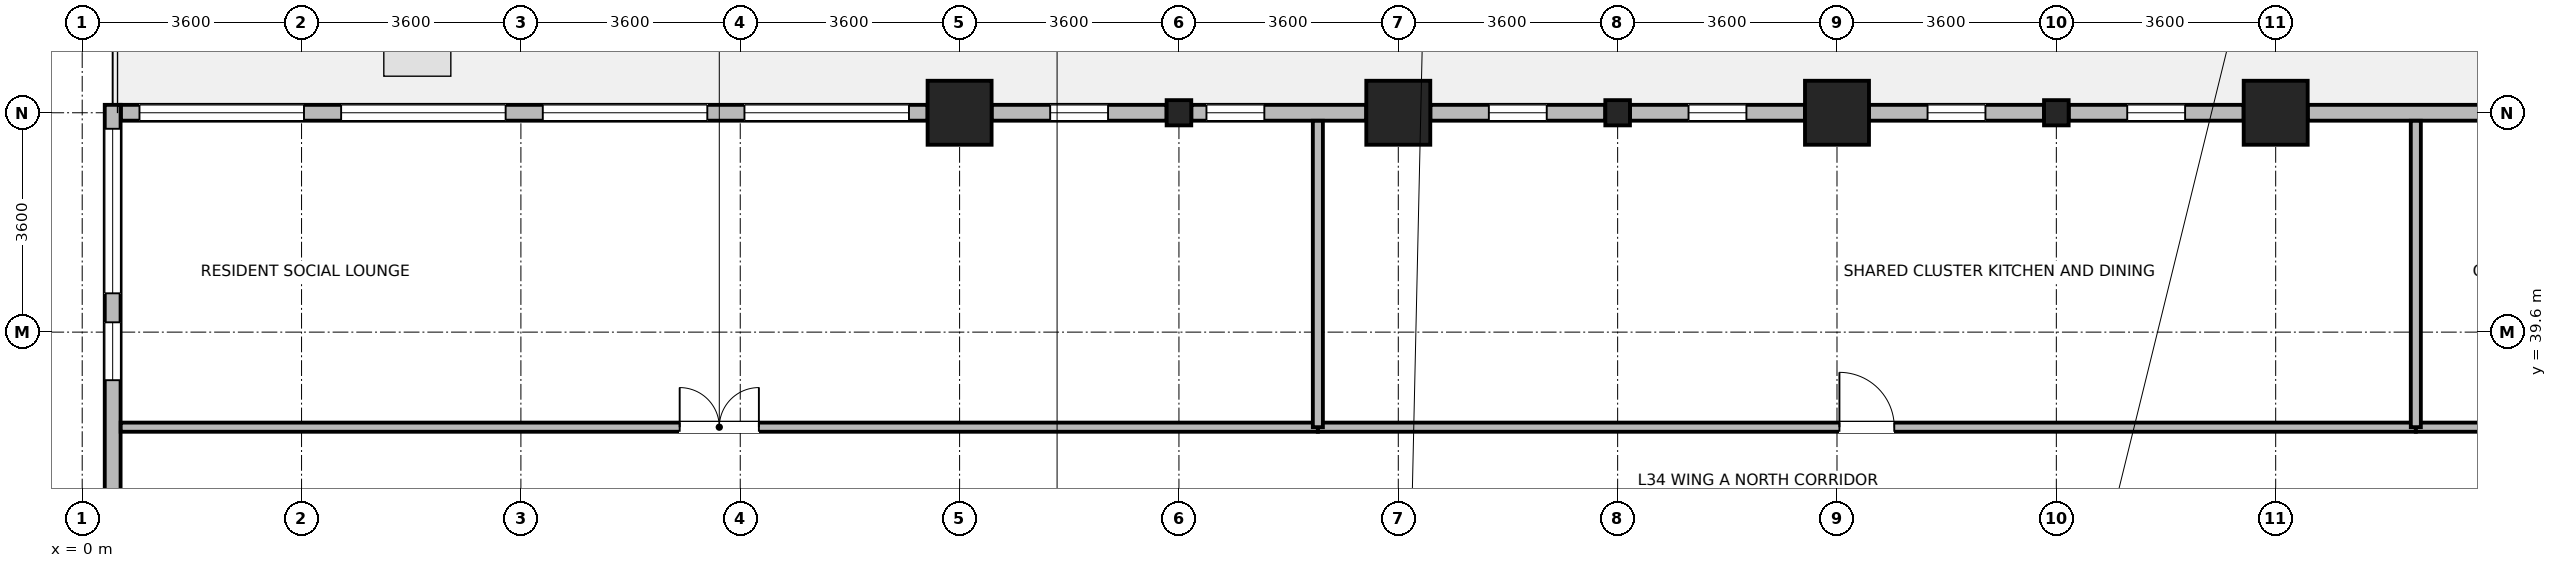
"""IFC4 building model, lengths in metres.
Left out: names, types, materials, properties, quantities, classifications, styles, units other than length and angle.
Written with IfcOpenShell. Run it as: python <this file> out.ifc"""

import sys

from ifc_helpers import new_model, si_unit, direction, frame, frame_2d, origin, origin_2d, place, context, subcontext, project, spatial, rectangle, i_section, extrude, source, transform, mapped, element, fill, save


model = new_model("IFC4")
c1 = context("Model", 3, precision=1e-05, world=origin(), true_north=direction((0.0, 1.0)))
c2 = subcontext(c1, "Body", "Model", "MODEL_VIEW")
j1 = project(units=[si_unit("LENGTHUNIT", "METRE"), si_unit("PLANEANGLEUNIT", "RADIAN")], contexts=[c1])
p1 = place(None, origin())
s1 = spatial("IfcSite", under=j1, at=p1, CompositionType="ELEMENT")
p2 = place(p1, origin())
s2 = spatial("IfcBuilding", under=s1, at=p2, CompositionType="ELEMENT")
p3 = place(p2, frame((0.0, 0.0, 135.6)))
s3 = spatial("IfcBuildingStorey", under=s2, at=p3, CompositionType="ELEMENT", Elevation=135.6)
m1 = source(origin(), c2, "Body", "SweptSolid", [
    extrude(rectangle(XDim=1.05, YDim=1.05, at=origin_2d()), origin(), (0.0, 0.0, 1.0), 4.6),
])
for number, where, z_axis, x_axis in (
    (1, (14.4, 43.2, 0.0), (0.0, 0.0, 1.0), (1.0, 0.0, 0.0)),
    (2, (21.6, 43.2, 0.0), (0.0, 0.0, 1.0), (1.0, 0.0, 0.0)),
    (3, (28.8, 43.2, 0.0), (0.0, 0.0, 1.0), (1.0, 0.0, 0.0)),
    (4, (36.0, 43.2, 0.0), (0.0, 0.0, 1.0), (1.0, 0.0, 0.0)),
):
    element("IfcColumn", number, at=place(p3, frame(where, z_axis=z_axis, x_axis=x_axis)), inside=s3, PredefinedType="COLUMN", context=c2, shape_type="MappedRepresentation", body=[
        mapped(m1, transform((0.0, 0.0, 0.0), x_axis=(1.0, 0.0, 0.0), y_axis=(0.0, 1.0, 0.0), z_axis=(0.0, 0.0, 1.0), scale=1.0)),
    ])
m2 = source(origin(), c2, "Body", "SweptSolid", [
    extrude(i_section(OverallWidth=0.404, OverallDepth=0.414, WebThickness=0.021, FlangeThickness=0.028, FilletRadius=0.015, at=origin_2d()), origin(), (0.0, 0.0, 1.0), 4.6),
])
for number, where, z_axis, x_axis in (
    (5, (18.0, 43.2, 0.0), (0.0, 0.0, 1.0), (1.0, 0.0, 0.0)),
    (6, (25.2, 43.2, 0.0), (0.0, 0.0, 1.0), (1.0, 0.0, 0.0)),
    (7, (32.4, 43.2, 0.0), (0.0, 0.0, 1.0), (1.0, 0.0, 0.0)),
):
    element("IfcColumn", number, at=place(p3, frame(where, z_axis=z_axis, x_axis=x_axis)), inside=s3, PredefinedType="COLUMN", context=c2, shape_type="MappedRepresentation", body=[
        mapped(m2, transform((0.0, 0.0, 0.0), x_axis=(1.0, 0.0, 0.0), y_axis=(0.0, 1.0, 0.0), z_axis=(0.0, 0.0, 1.0), scale=1.0)),
    ])
p4 = place(p3, frame((36.526, 43.2, 0.0), z_axis=(0.0, 0.0, 1.0), x_axis=(1.0, 0.0, 0.0)))
e8 = element("IfcWall", 8, at=p4, inside=s3, PredefinedType="STANDARD", context=c2, shape_type="SweptSolid", body=[
    extrude(rectangle(XDim=9.748, YDim=0.26, at=frame_2d((4.874, 0.0))), origin(), (0.0, 0.0, 1.0), 3.89),
])
p5 = place(p4, frame((3.524, 0.0, 0.85)))
e9 = element("IfcOpeningElement", 9, at=p5, cuts=e8, PredefinedType="OPENING", context=c2, shape_type="SweptSolid", body=[
    extrude(rectangle(XDim=2.7, YDim=2.05, at=frame_2d((1.35, 1.025))), frame((0.0, 0.14, 0.0), z_axis=(0.0, -1.0, 0.0), x_axis=(1.0, 0.0, 0.0)), (0.0, 0.0, 1.0), 0.28),
])
p6 = place(p4, frame((6.816, 0.0, 0.85)))
e10 = element("IfcOpeningElement", 10, at=p6, cuts=e8, PredefinedType="OPENING", context=c2, shape_type="SweptSolid", body=[
    extrude(rectangle(XDim=0.95, YDim=1.75, at=frame_2d((0.475, 0.875))), frame((0.0, 0.14, 0.0), z_axis=(0.0, -1.0, 0.0), x_axis=(1.0, 0.0, 0.0)), (0.0, 0.0, 1.0), 0.28),
])
p7 = place(p3, frame((32.603, 43.2, 0.0), z_axis=(0.0, 0.0, 1.0), x_axis=(1.0, 0.0, 0.0)))
e11 = element("IfcWall", 11, at=p7, inside=s3, PredefinedType="STANDARD", context=c2, shape_type="SweptSolid", body=[
    extrude(rectangle(XDim=2.871, YDim=0.26, at=frame_2d((1.436, 0.0))), origin(), (0.0, 0.0, 1.0), 3.89),
])
p8 = place(p7, frame((0.96, 0.0, 0.85)))
e12 = element("IfcOpeningElement", 12, at=p8, cuts=e11, PredefinedType="OPENING", context=c2, shape_type="SweptSolid", body=[
    extrude(rectangle(XDim=0.95, YDim=1.75, at=frame_2d((0.475, 0.875))), frame((0.0, 0.14, 0.0), z_axis=(0.0, -1.0, 0.0), x_axis=(1.0, 0.0, 0.0)), (0.0, 0.0, 1.0), 0.28),
])
p9 = place(p3, frame((29.326, 43.2, 0.0), z_axis=(0.0, 0.0, 1.0), x_axis=(1.0, 0.0, 0.0)))
e13 = element("IfcWall", 13, at=p9, inside=s3, PredefinedType="STANDARD", context=c2, shape_type="SweptSolid", body=[
    extrude(rectangle(XDim=2.871, YDim=0.26, at=frame_2d((1.436, 0.0))), origin(), (0.0, 0.0, 1.0), 3.89),
])
p10 = place(p9, frame((0.96, 0.0, 0.85)))
e14 = element("IfcOpeningElement", 14, at=p10, cuts=e13, PredefinedType="OPENING", context=c2, shape_type="SweptSolid", body=[
    extrude(rectangle(XDim=0.95, YDim=1.75, at=frame_2d((0.475, 0.875))), frame((0.0, 0.14, 0.0), z_axis=(0.0, -1.0, 0.0), x_axis=(1.0, 0.0, 0.0)), (0.0, 0.0, 1.0), 0.28),
])
p11 = place(p3, frame((25.403, 43.2, 0.0), z_axis=(0.0, 0.0, 1.0), x_axis=(1.0, 0.0, 0.0)))
e15 = element("IfcWall", 15, at=p11, inside=s3, PredefinedType="STANDARD", context=c2, shape_type="SweptSolid", body=[
    extrude(rectangle(XDim=2.871, YDim=0.26, at=frame_2d((1.436, 0.0))), origin(), (0.0, 0.0, 1.0), 3.89),
])
p12 = place(p11, frame((0.96, 0.0, 0.85)))
e16 = element("IfcOpeningElement", 16, at=p12, cuts=e15, PredefinedType="OPENING", context=c2, shape_type="SweptSolid", body=[
    extrude(rectangle(XDim=0.95, YDim=1.75, at=frame_2d((0.475, 0.875))), frame((0.0, 0.14, 0.0), z_axis=(0.0, -1.0, 0.0), x_axis=(1.0, 0.0, 0.0)), (0.0, 0.0, 1.0), 0.28),
])
p13 = place(p3, frame((22.126, 43.2, 0.0), z_axis=(0.0, 0.0, 1.0), x_axis=(1.0, 0.0, 0.0)))
e17 = element("IfcWall", 17, at=p13, inside=s3, PredefinedType="STANDARD", context=c2, shape_type="SweptSolid", body=[
    extrude(rectangle(XDim=2.871, YDim=0.26, at=frame_2d((1.436, 0.0))), origin(), (0.0, 0.0, 1.0), 3.89),
])
p14 = place(p13, frame((0.96, 0.0, 0.85)))
e18 = element("IfcOpeningElement", 18, at=p14, cuts=e17, PredefinedType="OPENING", context=c2, shape_type="SweptSolid", body=[
    extrude(rectangle(XDim=0.95, YDim=1.75, at=frame_2d((0.475, 0.875))), frame((0.0, 0.14, 0.0), z_axis=(0.0, -1.0, 0.0), x_axis=(1.0, 0.0, 0.0)), (0.0, 0.0, 1.0), 0.28),
])
p15 = place(p3, frame((18.203, 43.2, 0.0), z_axis=(0.0, 0.0, 1.0), x_axis=(1.0, 0.0, 0.0)))
e19 = element("IfcWall", 19, at=p15, inside=s3, PredefinedType="STANDARD", context=c2, shape_type="SweptSolid", body=[
    extrude(rectangle(XDim=2.871, YDim=0.26, at=frame_2d((1.436, 0.0))), origin(), (0.0, 0.0, 1.0), 3.89),
])
p16 = place(p15, frame((0.249, 0.0, 0.85)))
e20 = element("IfcOpeningElement", 20, at=p16, cuts=e19, PredefinedType="OPENING", context=c2, shape_type="SweptSolid", body=[
    extrude(rectangle(XDim=0.95, YDim=1.75, at=frame_2d((0.475, 0.875))), frame((0.0, 0.14, 0.0), z_axis=(0.0, -1.0, 0.0), x_axis=(1.0, 0.0, 0.0)), (0.0, 0.0, 1.0), 0.28),
])
p17 = place(p3, frame((14.926, 43.2, 0.0), z_axis=(0.0, 0.0, 1.0), x_axis=(1.0, 0.0, 0.0)))
e21 = element("IfcWall", 21, at=p17, inside=s3, PredefinedType="STANDARD", context=c2, shape_type="SweptSolid", body=[
    extrude(rectangle(XDim=2.871, YDim=0.26, at=frame_2d((1.436, 0.0))), origin(), (0.0, 0.0, 1.0), 3.89),
])
p18 = place(p17, frame((0.96, 0.0, 0.85)))
e22 = element("IfcOpeningElement", 22, at=p18, cuts=e21, PredefinedType="OPENING", context=c2, shape_type="SweptSolid", body=[
    extrude(rectangle(XDim=0.95, YDim=1.75, at=frame_2d((0.475, 0.875))), frame((0.0, 0.14, 0.0), z_axis=(0.0, -1.0, 0.0), x_axis=(1.0, 0.0, 0.0)), (0.0, 0.0, 1.0), 0.28),
])
p19 = place(p3, frame((0.635, 43.2, 0.0), z_axis=(0.0, 0.0, 1.0), x_axis=(1.0, 0.0, 0.0)))
e23 = element("IfcWall", 23, at=p19, inside=s3, PredefinedType="STANDARD", context=c2, shape_type="SweptSolid", body=[
    extrude(rectangle(XDim=13.239, YDim=0.26, at=frame_2d((6.62, 0.0))), origin(), (0.0, 0.0, 1.0), 4.34),
])
p20 = place(p19, frame((0.305, 0.0, 0.85)))
e24 = element("IfcOpeningElement", 24, at=p20, cuts=e23, PredefinedType="OPENING", context=c2, shape_type="SweptSolid", body=[
    extrude(rectangle(XDim=2.7, YDim=2.05, at=frame_2d((1.35, 1.025))), frame((0.0, 0.14, 0.0), z_axis=(0.0, -1.0, 0.0), x_axis=(1.0, 0.0, 0.0)), (0.0, 0.0, 1.0), 0.28),
])
p21 = place(p19, frame((3.615, 0.0, 0.85)))
e25 = element("IfcOpeningElement", 25, at=p21, cuts=e23, PredefinedType="OPENING", context=c2, shape_type="SweptSolid", body=[
    extrude(rectangle(XDim=2.7, YDim=2.05, at=frame_2d((1.35, 1.025))), frame((0.0, 0.14, 0.0), z_axis=(0.0, -1.0, 0.0), x_axis=(1.0, 0.0, 0.0)), (0.0, 0.0, 1.0), 0.28),
])
p22 = place(p19, frame((6.924, 0.0, 0.85)))
e26 = element("IfcOpeningElement", 26, at=p22, cuts=e23, PredefinedType="OPENING", context=c2, shape_type="SweptSolid", body=[
    extrude(rectangle(XDim=2.7, YDim=2.05, at=frame_2d((1.35, 1.025))), frame((0.0, 0.14, 0.0), z_axis=(0.0, -1.0, 0.0), x_axis=(1.0, 0.0, 0.0)), (0.0, 0.0, 1.0), 0.28),
])
p23 = place(p19, frame((10.234, 0.0, 0.85)))
e27 = element("IfcOpeningElement", 27, at=p23, cuts=e23, PredefinedType="OPENING", context=c2, shape_type="SweptSolid", body=[
    extrude(rectangle(XDim=2.7, YDim=2.05, at=frame_2d((1.35, 1.025))), frame((0.0, 0.14, 0.0), z_axis=(0.0, -1.0, 0.0), x_axis=(1.0, 0.0, 0.0)), (0.0, 0.0, 1.0), 0.28),
])
p24 = place(p3, frame((0.5, 36.358, 0.0), z_axis=(0.0, 0.0, 1.0), x_axis=(0.0, 1.0, 0.0)))
e28 = element("IfcWall", 28, at=p24, inside=s3, PredefinedType="STANDARD", context=c2, shape_type="SweptSolid", body=[
    extrude(rectangle(XDim=6.972, YDim=0.26, at=frame_2d((3.486, 0.0))), origin(), (0.0, 0.0, 1.0), 4.34),
])
p25 = place(p24, frame((3.879, 0.0, 0.85)))
e29 = element("IfcOpeningElement", 29, at=p25, cuts=e28, PredefinedType="OPENING", context=c2, shape_type="SweptSolid", body=[
    extrude(rectangle(XDim=2.7, YDim=2.05, at=frame_2d((1.35, 1.025))), frame((0.0, 0.14, 0.0), z_axis=(0.0, -1.0, 0.0), x_axis=(1.0, 0.0, 0.0)), (0.0, 0.0, 1.0), 0.28),
])
p26 = place(p24, frame((2.453, 0.0, 0.85)))
e30 = element("IfcOpeningElement", 30, at=p26, cuts=e28, PredefinedType="OPENING", context=c2, shape_type="SweptSolid", body=[
    extrude(rectangle(XDim=0.95, YDim=1.75, at=frame_2d((0.475, 0.875))), frame((0.0, 0.14, 0.0), z_axis=(0.0, -1.0, 0.0), x_axis=(1.0, 0.0, 0.0)), (0.0, 0.0, 1.0), 0.28),
])
p27 = place(p3, frame((0.632, 38.04, 0.0), z_axis=(0.0, 0.0, 1.0), x_axis=(1.0, 0.0, 0.0)))
e31 = element("IfcWall", 31, at=p27, inside=s3, PredefinedType="PARTITIONING", context=c2, shape_type="SweptSolid", body=[
    extrude(rectangle(XDim=19.648, YDim=0.15, at=frame_2d((9.824, 0.0))), origin(), (0.0, 0.0, 1.0), 4.34),
])
p28 = place(p27, frame((9.174, 0.0, 0.0)))
e32 = element("IfcOpeningElement", 32, at=p28, cuts=e31, PredefinedType="OPENING", context=c2, shape_type="SweptSolid", body=[
    extrude(rectangle(XDim=1.3, YDim=2.12, at=frame_2d((0.65, 1.06))), frame((0.0, 0.085, 0.0), z_axis=(0.0, -1.0, 0.0), x_axis=(1.0, 0.0, 0.0)), (0.0, 0.0, 1.0), 0.17),
])
p29 = place(p3, frame((20.28, 38.04, 0.0), z_axis=(0.0, 0.0, 1.0), x_axis=(1.0, 0.0, 0.0)))
e33 = element("IfcWall", 33, at=p29, inside=s3, PredefinedType="PARTITIONING", context=c2, shape_type="SweptSolid", body=[
    extrude(rectangle(XDim=18.02, YDim=0.15, at=frame_2d((9.01, 0.0))), origin(), (0.0, 0.0, 1.0), 4.34),
])
p30 = place(p29, frame((8.56, 0.0, 0.0)))
e34 = element("IfcOpeningElement", 34, at=p30, cuts=e33, PredefinedType="OPENING", context=c2, shape_type="SweptSolid", body=[
    extrude(rectangle(XDim=0.9, YDim=2.08, at=frame_2d((0.45, 1.04))), frame((0.0, 0.085, 0.0), z_axis=(0.0, -1.0, 0.0), x_axis=(1.0, 0.0, 0.0)), (0.0, 0.0, 1.0), 0.17),
])
p31 = place(p3, frame((38.3, 38.04, 0.0), z_axis=(0.0, 0.0, 1.0), x_axis=(1.0, 0.0, 0.0)))
e35 = element("IfcWall", 35, at=p31, inside=s3, PredefinedType="PARTITIONING", context=c2, shape_type="SweptSolid", body=[
    extrude(rectangle(XDim=11.46, YDim=0.15, at=frame_2d((5.73, 0.0))), origin(), (0.0, 0.0, 1.0), 4.34),
])
p32 = place(p31, frame((5.08, 0.0, 0.0)))
e36 = element("IfcOpeningElement", 36, at=p32, cuts=e35, PredefinedType="OPENING", context=c2, shape_type="SweptSolid", body=[
    extrude(rectangle(XDim=1.3, YDim=2.12, at=frame_2d((0.65, 1.06))), frame((0.0, 0.085, 0.0), z_axis=(0.0, -1.0, 0.0), x_axis=(1.0, 0.0, 0.0)), (0.0, 0.0, 1.0), 0.17),
])
for number, where, z_axis, x_axis in (
    (37, (20.28, 38.04, 0.0), (0.0, 0.0, 1.0), (0.0, 1.0, 0.0)),
    (38, (38.3, 38.04, 0.0), (0.0, 0.0, 1.0), (0.0, 1.0, 0.0)),
):
    element("IfcWall", number, at=place(p3, frame(where, z_axis=z_axis, x_axis=x_axis)), inside=s3, PredefinedType="PARTITIONING", context=c2, shape_type="SweptSolid", body=[
        extrude(rectangle(XDim=5.028, YDim=0.165, at=frame_2d((2.514, 0.0))), origin(), (0.0, 0.0, 1.0), 4.34),
    ])
p33 = place(p8, origin())
e39 = element("IfcWindow", 39, at=p33, inside=s3, PartitioningType="SINGLE_PANEL", PredefinedType="WINDOW", context=c2, shape_type="SweptSolid", body=[
    extrude(rectangle(XDim=0.95, YDim=1.75, at=frame_2d((0.475, 0.875))), frame((0.0, 0.03, 0.0), z_axis=(0.0, -1.0, 0.0), x_axis=(1.0, 0.0, 0.0)), (0.0, 0.0, 1.0), 0.06),
])
fill(e12, e39)
p34 = place(p10, origin())
e40 = element("IfcWindow", 40, at=p34, inside=s3, PartitioningType="SINGLE_PANEL", PredefinedType="WINDOW", context=c2, shape_type="SweptSolid", body=[
    extrude(rectangle(XDim=0.95, YDim=1.75, at=frame_2d((0.475, 0.875))), frame((0.0, 0.03, 0.0), z_axis=(0.0, -1.0, 0.0), x_axis=(1.0, 0.0, 0.0)), (0.0, 0.0, 1.0), 0.06),
])
fill(e14, e40)
p35 = place(p12, origin())
e41 = element("IfcWindow", 41, at=p35, inside=s3, PartitioningType="SINGLE_PANEL", PredefinedType="WINDOW", context=c2, shape_type="SweptSolid", body=[
    extrude(rectangle(XDim=0.95, YDim=1.75, at=frame_2d((0.475, 0.875))), frame((0.0, 0.03, 0.0), z_axis=(0.0, -1.0, 0.0), x_axis=(1.0, 0.0, 0.0)), (0.0, 0.0, 1.0), 0.06),
])
fill(e16, e41)
p36 = place(p14, origin())
e42 = element("IfcWindow", 42, at=p36, inside=s3, PartitioningType="SINGLE_PANEL", PredefinedType="WINDOW", context=c2, shape_type="SweptSolid", body=[
    extrude(rectangle(XDim=0.95, YDim=1.75, at=frame_2d((0.475, 0.875))), frame((0.0, 0.03, 0.0), z_axis=(0.0, -1.0, 0.0), x_axis=(1.0, 0.0, 0.0)), (0.0, 0.0, 1.0), 0.06),
])
fill(e18, e42)
p37 = place(p16, origin())
e43 = element("IfcWindow", 43, at=p37, inside=s3, PartitioningType="SINGLE_PANEL", PredefinedType="WINDOW", context=c2, shape_type="SweptSolid", body=[
    extrude(rectangle(XDim=0.95, YDim=1.75, at=frame_2d((0.475, 0.875))), frame((0.0, 0.03, 0.0), z_axis=(0.0, -1.0, 0.0), x_axis=(1.0, 0.0, 0.0)), (0.0, 0.0, 1.0), 0.06),
])
fill(e20, e43)
p38 = place(p18, origin())
e44 = element("IfcWindow", 44, at=p38, inside=s3, PartitioningType="SINGLE_PANEL", PredefinedType="WINDOW", context=c2, shape_type="SweptSolid", body=[
    extrude(rectangle(XDim=0.95, YDim=1.75, at=frame_2d((0.475, 0.875))), frame((0.0, 0.03, 0.0), z_axis=(0.0, -1.0, 0.0), x_axis=(1.0, 0.0, 0.0)), (0.0, 0.0, 1.0), 0.06),
])
fill(e22, e44)
p39 = place(p20, origin())
e45 = element("IfcWindow", 45, at=p39, inside=s3, PartitioningType="SINGLE_PANEL", PredefinedType="WINDOW", context=c2, shape_type="SweptSolid", body=[
    extrude(rectangle(XDim=2.7, YDim=2.05, at=frame_2d((1.35, 1.025))), frame((0.0, 0.03, 0.0), z_axis=(0.0, -1.0, 0.0), x_axis=(1.0, 0.0, 0.0)), (0.0, 0.0, 1.0), 0.06),
])
fill(e24, e45)
p40 = place(p21, origin())
e46 = element("IfcWindow", 46, at=p40, inside=s3, PartitioningType="SINGLE_PANEL", PredefinedType="WINDOW", context=c2, shape_type="SweptSolid", body=[
    extrude(rectangle(XDim=2.7, YDim=2.05, at=frame_2d((1.35, 1.025))), frame((0.0, 0.03, 0.0), z_axis=(0.0, -1.0, 0.0), x_axis=(1.0, 0.0, 0.0)), (0.0, 0.0, 1.0), 0.06),
])
fill(e25, e46)
p41 = place(p22, origin())
e47 = element("IfcWindow", 47, at=p41, inside=s3, PartitioningType="SINGLE_PANEL", PredefinedType="WINDOW", context=c2, shape_type="SweptSolid", body=[
    extrude(rectangle(XDim=2.7, YDim=2.05, at=frame_2d((1.35, 1.025))), frame((0.0, 0.03, 0.0), z_axis=(0.0, -1.0, 0.0), x_axis=(1.0, 0.0, 0.0)), (0.0, 0.0, 1.0), 0.06),
])
fill(e26, e47)
p42 = place(p23, origin())
e48 = element("IfcWindow", 48, at=p42, inside=s3, PartitioningType="SINGLE_PANEL", PredefinedType="WINDOW", context=c2, shape_type="SweptSolid", body=[
    extrude(rectangle(XDim=2.7, YDim=2.05, at=frame_2d((1.35, 1.025))), frame((0.0, 0.03, 0.0), z_axis=(0.0, -1.0, 0.0), x_axis=(1.0, 0.0, 0.0)), (0.0, 0.0, 1.0), 0.06),
])
fill(e27, e48)
p43 = place(p25, origin())
e49 = element("IfcWindow", 49, at=p43, inside=s3, PartitioningType="SINGLE_PANEL", PredefinedType="WINDOW", context=c2, shape_type="SweptSolid", body=[
    extrude(rectangle(XDim=2.7, YDim=2.05, at=frame_2d((1.35, 1.025))), frame((0.0, 0.03, 0.0), z_axis=(0.0, -1.0, 0.0), x_axis=(1.0, 0.0, 0.0)), (0.0, 0.0, 1.0), 0.06),
])
fill(e29, e49)
p44 = place(p26, origin())
e50 = element("IfcWindow", 50, at=p44, inside=s3, PartitioningType="SINGLE_PANEL", PredefinedType="WINDOW", context=c2, shape_type="SweptSolid", body=[
    extrude(rectangle(XDim=0.95, YDim=1.75, at=frame_2d((0.475, 0.875))), frame((0.0, 0.03, 0.0), z_axis=(0.0, -1.0, 0.0), x_axis=(1.0, 0.0, 0.0)), (0.0, 0.0, 1.0), 0.06),
])
fill(e30, e50)
p45 = place(p28, origin())
e51 = element("IfcDoor", 51, at=p45, inside=s3, OperationType="DOUBLE_DOOR_SINGLE_SWING", PredefinedType="DOOR", context=c2, shape_type="SweptSolid", body=[
    extrude(rectangle(XDim=1.3, YDim=2.12, at=frame_2d((0.65, 1.06))), frame((0.0, 0.025, 0.0), z_axis=(0.0, -1.0, 0.0), x_axis=(1.0, 0.0, 0.0)), (0.0, 0.0, 1.0), 0.05),
])
fill(e32, e51)
p46 = place(p30, origin())
e52 = element("IfcDoor", 52, at=p46, inside=s3, OperationType="SINGLE_SWING_LEFT", PredefinedType="DOOR", context=c2, shape_type="SweptSolid", body=[
    extrude(rectangle(XDim=0.9, YDim=2.08, at=frame_2d((0.45, 1.04))), frame((0.0, 0.025, 0.0), z_axis=(0.0, -1.0, 0.0), x_axis=(1.0, 0.0, 0.0)), (0.0, 0.0, 1.0), 0.05),
])
fill(e34, e52)
save(model, sys.argv[1])
